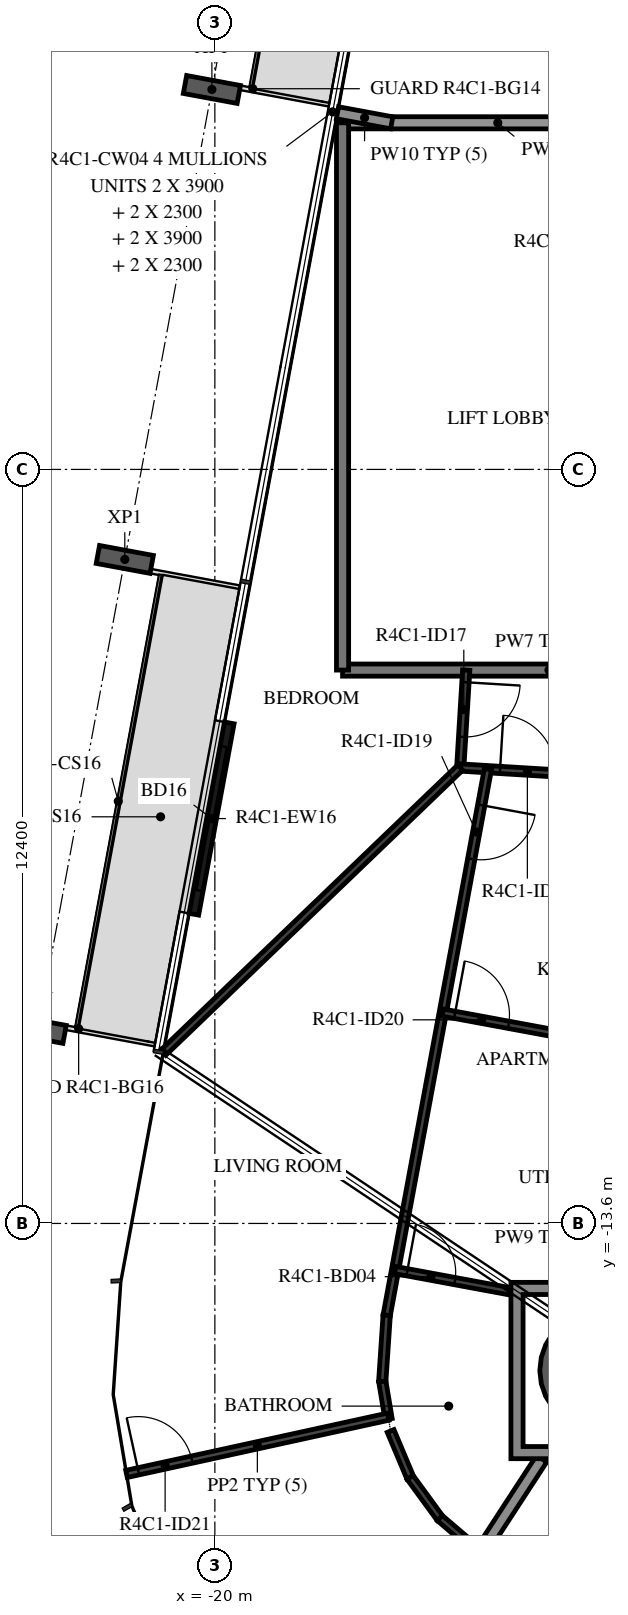
"""IFC4 building model, lengths in metres.
Left out: names, types, materials, properties, quantities, classifications, styles, units other than length and angle.
Written with IfcOpenShell. Run it as: python <this file> out.ifc"""

import sys

from ifc_helpers import new_model, si_unit, direction, frame, frame_2d, origin, origin_2d, place, context, subcontext, project, spatial, polyline, rectangle, hollow_circle, i_section, outline, extrude, element, fill, save


model = new_model("IFC4")
c1 = context("Model", 3, precision=1e-05, world=origin(), true_north=direction((0.0, 1.0)))
c2 = subcontext(c1, "Body", "Model", "MODEL_VIEW")
j1 = project(units=[si_unit("LENGTHUNIT", "METRE"), si_unit("PLANEANGLEUNIT", "RADIAN")], contexts=[c1])
p1 = place(None, origin())
s1 = spatial("IfcSite", under=j1, at=p1, CompositionType="ELEMENT")
p2 = place(p1, origin())
s2 = spatial("IfcBuilding", under=s1, at=p2, CompositionType="ELEMENT")
p3 = place(p2, frame((0.0, 0.0, 176.2)))
s3 = spatial("IfcBuildingStorey", under=s2, at=p3, CompositionType="ELEMENT", Elevation=176.2)
p4 = place(p3, frame((-13.681, -16.019, -0.38), z_axis=(0.0, 0.0, 1.0), x_axis=(1.0, 0.0, 0.0)))
e1 = element("IfcColumn", 1, at=p4, inside=s3, PredefinedType="COLUMN", context=c2, shape_type="SweptSolid", body=[
    extrude(hollow_circle(Radius=0.975, WallThickness=0.045, at=origin_2d()), origin(), (0.0, 0.0, 1.0), 3.5),
])
for number, where, z_axis, x_axis in (
    (2, (-20.049, 5.048, -0.38), (0.0, 0.0, 1.0), (0.182, 0.983, 0.0)),
    (3, (-21.481, -2.68, -0.38), (0.0, 0.0, 1.0), (0.182, 0.983, 0.0)),
    (4, (-22.914, -10.409, -0.38), (0.0, 0.0, 1.0), (0.182, 0.983, 0.0)),
):
    element("IfcColumn", number, at=place(p3, frame(where, z_axis=z_axis, x_axis=x_axis)), inside=s3, PredefinedType="COLUMN", context=c2, shape_type="SweptSolid", body=[
        extrude(i_section(OverallWidth=0.3, OverallDepth=0.9, WebThickness=0.019, FlangeThickness=0.035, FilletRadius=0.03, at=origin_2d()), origin(), (0.0, 0.0, 1.0), 3.5),
    ])
p5 = place(p3, frame((-19.762, -5.369, 0.0), z_axis=(0.0, 0.0, 1.0), x_axis=(-0.18226136951, -0.983250117307, 0.0)))
e5 = element("IfcWall", 5, at=p5, inside=s3, PredefinedType="STANDARD", context=c2, shape_type="SweptSolid", body=[
    extrude(rectangle(XDim=3.2, YDim=0.16, at=frame_2d((1.6, 0.0))), origin(), (0.0, 0.0, 1.0), 3.12),
])
p6 = place(p5, frame((0.4, 0.0, 0.0)))
e6 = element("IfcOpeningElement", 6, at=p6, cuts=e5, PredefinedType="OPENING", context=c2, shape_type="SweptSolid", body=[
    extrude(rectangle(XDim=2.4, YDim=2.4, at=frame_2d((1.2, 1.2))), frame((0.0, 0.09, 0.0), z_axis=(0.0, -1.0, 0.0), x_axis=(1.0, 0.0, 0.0)), (0.0, 0.0, 1.0), 0.18),
])
p7 = place(p3, frame((-12.794, 4.5, 0.0), z_axis=(0.0, 0.0, 1.0), x_axis=(-1.0, 0.0, 0.0)))
e7 = element("IfcWall", 7, at=p7, inside=s3, PredefinedType="STANDARD", context=c2, shape_type="SweptSolid", body=[
    extrude(rectangle(XDim=5.106, YDim=0.2, at=frame_2d((2.553, 0.0))), origin(), (0.0, 0.0, 1.0), 2.73),
])
p8 = place(p3, frame((-17.9, -4.5, 0.0), z_axis=(0.0, 0.0, 1.0), x_axis=(1.0, 0.0, 0.0)))
e8 = element("IfcWall", 8, at=p8, inside=s3, PredefinedType="STANDARD", context=c2, shape_type="SweptSolid", body=[
    extrude(rectangle(XDim=6.789, YDim=0.2, at=frame_2d((3.394, 0.0))), origin(), (0.0, 0.0, 1.0), 3.12),
])
p9 = place(p3, frame((-17.9, 4.5, 0.0), z_axis=(0.0, 0.0, 1.0), x_axis=(0.0, -1.0, 0.0)))
e9 = element("IfcWall", 9, at=p9, inside=s3, PredefinedType="STANDARD", context=c2, shape_type="SweptSolid", body=[
    extrude(rectangle(XDim=9.0, YDim=0.2, at=frame_2d((4.5, 0.0))), origin(), (0.0, 0.0, 1.0), 3.12),
])
p10 = place(p3, frame((-17.984, 4.665, 0.0), z_axis=(0.0, 0.0, 1.0), x_axis=(0.98328378843, -0.182079629313, 0.0)))
e10 = element("IfcWall", 10, at=p10, inside=s3, PredefinedType="STANDARD", context=c2, shape_type="SweptSolid", body=[
    extrude(rectangle(XDim=0.908, YDim=0.2, at=frame_2d((0.454, 0.0))), origin(), (0.0, 0.0, 1.0), 2.73),
])
p11 = place(p3, frame((-18.04, -22.713, 0.0), z_axis=(0.0, 0.0, 1.0), x_axis=(0.545628572271, 0.838027124335, 0.0)))
e11 = element("IfcWall", 11, at=p11, inside=s3, PredefinedType="STANDARD", context=c2, shape_type="SweptSolid", body=[
    extrude(rectangle(XDim=6.258, YDim=0.2, at=frame_2d((3.129, 0.0))), origin(), (0.0, 0.0, 1.0), 2.73),
])
p12 = place(p3, frame((-15.866, -4.5, 0.0), z_axis=(0.0, 0.0, 1.0), x_axis=(-0.060986374837, -0.998138598635, 0.0)))
e12 = element("IfcWall", 12, at=p12, inside=s3, PredefinedType="PARTITIONING", context=c2, shape_type="SweptSolid", body=[
    extrude(rectangle(XDim=1.605, YDim=0.12, at=frame_2d((0.803, 0.0))), origin(), (0.0, 0.0, 1.0), 3.12),
])
p13 = place(p12, frame((0.2, 0.0, 0.0)))
e13 = element("IfcOpeningElement", 13, at=p13, cuts=e12, PredefinedType="OPENING", context=c2, shape_type="SweptSolid", body=[
    extrude(rectangle(XDim=0.9, YDim=2.1, at=frame_2d((0.45, 1.05))), frame((0.0, 0.07, 0.0), z_axis=(0.0, -1.0, 0.0), x_axis=(1.0, 0.0, 0.0)), (0.0, 0.0, 1.0), 0.14),
])
p14 = place(p3, frame((-15.964, -6.102, 0.0), z_axis=(0.0, 0.0, 1.0), x_axis=(0.998145469708, -0.060873814574, 0.0)))
e14 = element("IfcWall", 14, at=p14, inside=s3, PredefinedType="PARTITIONING", context=c2, shape_type="SweptSolid", body=[
    extrude(rectangle(XDim=2.374, YDim=0.12, at=frame_2d((1.187, 0.0))), origin(), (0.0, 0.0, 1.0), 3.12),
])
p15 = place(p14, frame((0.656, 0.0, 0.0)))
e15 = element("IfcOpeningElement", 15, at=p15, cuts=e14, PredefinedType="OPENING", context=c2, shape_type="SweptSolid", body=[
    extrude(rectangle(XDim=0.9, YDim=2.1, at=frame_2d((0.45, 1.05))), frame((0.0, 0.07, 0.0), z_axis=(0.0, -1.0, 0.0), x_axis=(1.0, 0.0, 0.0)), (0.0, 0.0, 1.0), 0.14),
])
p16 = place(p3, frame((-20.849, -10.792, 0.0), z_axis=(0.0, 0.0, 1.0), x_axis=(0.721364983662, 0.692555095531, 0.0)))
e16 = element("IfcWall", 16, at=p16, inside=s3, PredefinedType="PARTITIONING", context=c2, shape_type="SweptSolid", body=[
    extrude(rectangle(XDim=6.771, YDim=0.12, at=frame_2d((3.385, 0.0))), origin(), (0.0, 0.0, 1.0), 3.12),
])
p17 = place(p3, frame((-15.51, -6.13, 0.0), z_axis=(0.0, 0.0, 1.0), x_axis=(-0.182243361628, -0.98325345519, 0.0)))
e17 = element("IfcWall", 17, at=p17, inside=s3, PredefinedType="PARTITIONING", context=c2, shape_type="SweptSolid", body=[
    extrude(rectangle(XDim=9.134, YDim=0.12, at=frame_2d((4.567, 0.0))), origin(), (0.0, 0.0, 1.0), 3.12),
])
p18 = place(p17, frame((0.6, 0.0, 0.0)))
e18 = element("IfcOpeningElement", 18, at=p18, cuts=e17, PredefinedType="OPENING", context=c2, shape_type="SweptSolid", body=[
    extrude(rectangle(XDim=0.9, YDim=2.1, at=frame_2d((0.45, 1.05))), frame((0.0, 0.07, 0.0), z_axis=(0.0, -1.0, 0.0), x_axis=(1.0, 0.0, 0.0)), (0.0, 0.0, 1.0), 0.14),
])
p19 = place(p3, frame((-16.252, -10.133, 0.0), z_axis=(0.0, 0.0, 1.0), x_axis=(0.983256998026, -0.182224246005, 0.0)))
e19 = element("IfcWall", 19, at=p19, inside=s3, PredefinedType="PARTITIONING", context=c2, shape_type="SweptSolid", body=[
    extrude(rectangle(XDim=6.671, YDim=0.12, at=frame_2d((3.335, 0.0))), origin(), (0.0, 0.0, 1.0), 3.12),
])
p20 = place(p19, frame((0.2, 0.0, 0.0)))
e20 = element("IfcOpeningElement", 20, at=p20, cuts=e19, PredefinedType="OPENING", context=c2, shape_type="SweptSolid", body=[
    extrude(rectangle(XDim=0.9, YDim=2.1, at=frame_2d((0.45, 1.05))), frame((0.0, 0.07, 0.0), z_axis=(0.0, -1.0, 0.0), x_axis=(1.0, 0.0, 0.0)), (0.0, 0.0, 1.0), 0.14),
])
p21 = place(p3, frame((-17.143, -16.817, 0.0), z_axis=(0.0, 0.0, 1.0), x_axis=(-0.164964120994, 0.98629956848, 0.0)))
e21 = element("IfcWall", 21, at=p21, inside=s3, PredefinedType="PARTITIONING", context=c2, shape_type="SweptSolid", body=[
    extrude(rectangle(XDim=0.63, YDim=0.12, at=frame_2d((0.315, 0.0))), origin(), (0.0, 0.0, 1.0), 3.12),
])
p22 = place(p3, frame((-17.247, -16.195, 0.0), z_axis=(0.0, 0.0, 1.0), x_axis=(0.066712820538, 0.997772218282, 0.0)))
e22 = element("IfcWall", 22, at=p22, inside=s3, PredefinedType="PARTITIONING", context=c2, shape_type="SweptSolid", body=[
    extrude(rectangle(XDim=1.087, YDim=0.12, at=frame_2d((0.543, 0.0))), origin(), (0.0, 0.0, 1.0), 3.12),
])
p23 = place(p3, frame((-21.453, -17.719, 0.0), z_axis=(0.0, 0.0, 1.0), x_axis=(0.976887361549, 0.213754725903, 0.0)))
e23 = element("IfcWall", 23, at=p23, inside=s3, PredefinedType="PARTITIONING", context=c2, shape_type="SweptSolid", body=[
    extrude(rectangle(XDim=4.405, YDim=0.12, at=frame_2d((2.203, 0.0))), origin(), (0.0, 0.0, 1.0), 2.73),
])
p24 = place(p23, frame((0.2, 0.0, 0.0)))
e24 = element("IfcOpeningElement", 24, at=p24, cuts=e23, PredefinedType="OPENING", context=c2, shape_type="SweptSolid", body=[
    extrude(rectangle(XDim=0.9, YDim=2.1, at=frame_2d((0.45, 1.05))), frame((0.0, 0.07, 0.0), z_axis=(0.0, -1.0, 0.0), x_axis=(1.0, 0.0, 0.0)), (0.0, 0.0, 1.0), 0.14),
])
p25 = place(p3, frame((-17.036, -14.366, 0.0), z_axis=(0.0, 0.0, 1.0), x_axis=(0.983259435886, -0.182211091156, 0.0)))
e25 = element("IfcWall", 25, at=p25, inside=s3, PredefinedType="PARTITIONING", context=c2, shape_type="SweptSolid", body=[
    extrude(rectangle(XDim=1.938, YDim=0.12, at=frame_2d((0.969, 0.0))), origin(), (0.0, 0.0, 1.0), 3.12),
])
p26 = place(p25, frame((0.2, 0.0, 0.0)))
e26 = element("IfcOpeningElement", 26, at=p26, cuts=e25, PredefinedType="OPENING", context=c2, shape_type="SweptSolid", body=[
    extrude(rectangle(XDim=0.8, YDim=2.1, at=frame_2d((0.4, 1.05))), frame((0.0, 0.07, 0.0), z_axis=(0.0, -1.0, 0.0), x_axis=(1.0, 0.0, 0.0)), (0.0, 0.0, 1.0), 0.14),
])
for number, where, z_axis, x_axis in (
    (27, (-17.11, -17.013, 0.0), (0.0, 0.0, 1.0), (0.388, -0.922, 0.0)),
    (28, (-16.788, -17.777, 0.0), (0.0, 0.0, 1.0), (0.59, -0.807, 0.0)),
    (29, (-16.299, -18.446, 0.0), (0.0, 0.0, 1.0), (0.76, -0.649, 0.0)),
):
    element("IfcWall", number, at=place(p3, frame(where, z_axis=z_axis, x_axis=x_axis)), inside=s3, PredefinedType="PARTITIONING", context=c2, shape_type="SweptSolid", body=[
        extrude(rectangle(XDim=0.829, YDim=0.12, at=frame_2d((0.415, 0.0))), origin(), (0.0, 0.0, 1.0), 3.12),
    ])
p27 = place(p3, origin())
e30 = element("IfcWall", 30, at=p27, inside=s3, PredefinedType="STANDARD", context=c2, shape_type="SweptSolid", body=[
    extrude(outline(polyline([(-12.231, -14.569), (-12.231, -17.469), (-15.131, -17.469), (-15.131, -14.569), (-12.231, -14.569)]), holes=[polyline([(-14.931, -17.269), (-12.431, -17.269), (-12.431, -14.769), (-14.931, -14.769), (-14.931, -17.269)])]), origin(), (0.0, 0.0, 1.0), 3.12),
])
p28 = place(p6, origin())
e31 = element("IfcDoor", 31, at=p28, inside=s3, OperationType="DOUBLE_DOOR_SLIDING", PredefinedType="DOOR", context=c2, shape_type="SweptSolid", body=[
    extrude(rectangle(XDim=2.4, YDim=2.4, at=frame_2d((1.2, 1.2))), frame((0.0, 0.025, 0.0), z_axis=(0.0, -1.0, 0.0), x_axis=(1.0, 0.0, 0.0)), (0.0, 0.0, 1.0), 0.05),
])
fill(e6, e31)
p29 = place(p13, origin())
e32 = element("IfcDoor", 32, at=p29, inside=s3, OperationType="SINGLE_SWING_RIGHT", PredefinedType="DOOR", context=c2, shape_type="SweptSolid", body=[
    extrude(rectangle(XDim=0.9, YDim=2.1, at=frame_2d((0.45, 1.05))), frame((0.0, 0.025, 0.0), z_axis=(0.0, -1.0, 0.0), x_axis=(1.0, 0.0, 0.0)), (0.0, 0.0, 1.0), 0.05),
])
fill(e13, e32)
p30 = place(p15, origin())
e33 = element("IfcDoor", 33, at=p30, inside=s3, OperationType="SINGLE_SWING_RIGHT", PredefinedType="DOOR", context=c2, shape_type="SweptSolid", body=[
    extrude(rectangle(XDim=0.9, YDim=2.1, at=frame_2d((0.45, 1.05))), frame((0.0, 0.025, 0.0), z_axis=(0.0, -1.0, 0.0), x_axis=(1.0, 0.0, 0.0)), (0.0, 0.0, 1.0), 0.05),
])
fill(e15, e33)
p31 = place(p18, origin())
e34 = element("IfcDoor", 34, at=p31, inside=s3, OperationType="SINGLE_SWING_RIGHT", PredefinedType="DOOR", context=c2, shape_type="SweptSolid", body=[
    extrude(rectangle(XDim=0.9, YDim=2.1, at=frame_2d((0.45, 1.05))), frame((0.0, 0.025, 0.0), z_axis=(0.0, -1.0, 0.0), x_axis=(1.0, 0.0, 0.0)), (0.0, 0.0, 1.0), 0.05),
])
fill(e18, e34)
p32 = place(p20, origin())
e35 = element("IfcDoor", 35, at=p32, inside=s3, OperationType="SINGLE_SWING_RIGHT", PredefinedType="DOOR", context=c2, shape_type="SweptSolid", body=[
    extrude(rectangle(XDim=0.9, YDim=2.1, at=frame_2d((0.45, 1.05))), frame((0.0, 0.025, 0.0), z_axis=(0.0, -1.0, 0.0), x_axis=(1.0, 0.0, 0.0)), (0.0, 0.0, 1.0), 0.05),
])
fill(e20, e35)
p33 = place(p26, origin())
e36 = element("IfcDoor", 36, at=p33, inside=s3, OperationType="SINGLE_SWING_RIGHT", PredefinedType="DOOR", context=c2, shape_type="SweptSolid", body=[
    extrude(rectangle(XDim=0.8, YDim=2.1, at=frame_2d((0.4, 1.05))), frame((0.0, 0.025, 0.0), z_axis=(0.0, -1.0, 0.0), x_axis=(1.0, 0.0, 0.0)), (0.0, 0.0, 1.0), 0.05),
])
fill(e26, e36)
p34 = place(p24, origin())
e37 = element("IfcDoor", 37, at=p34, inside=s3, OperationType="SINGLE_SWING_RIGHT", PredefinedType="DOOR", context=c2, shape_type="SweptSolid", body=[
    extrude(rectangle(XDim=0.9, YDim=2.1, at=frame_2d((0.45, 1.05))), frame((0.0, 0.025, 0.0), z_axis=(0.0, -1.0, 0.0), x_axis=(1.0, 0.0, 0.0)), (0.0, 0.0, 1.0), 0.05),
])
fill(e24, e37)
save(model, sys.argv[1])
